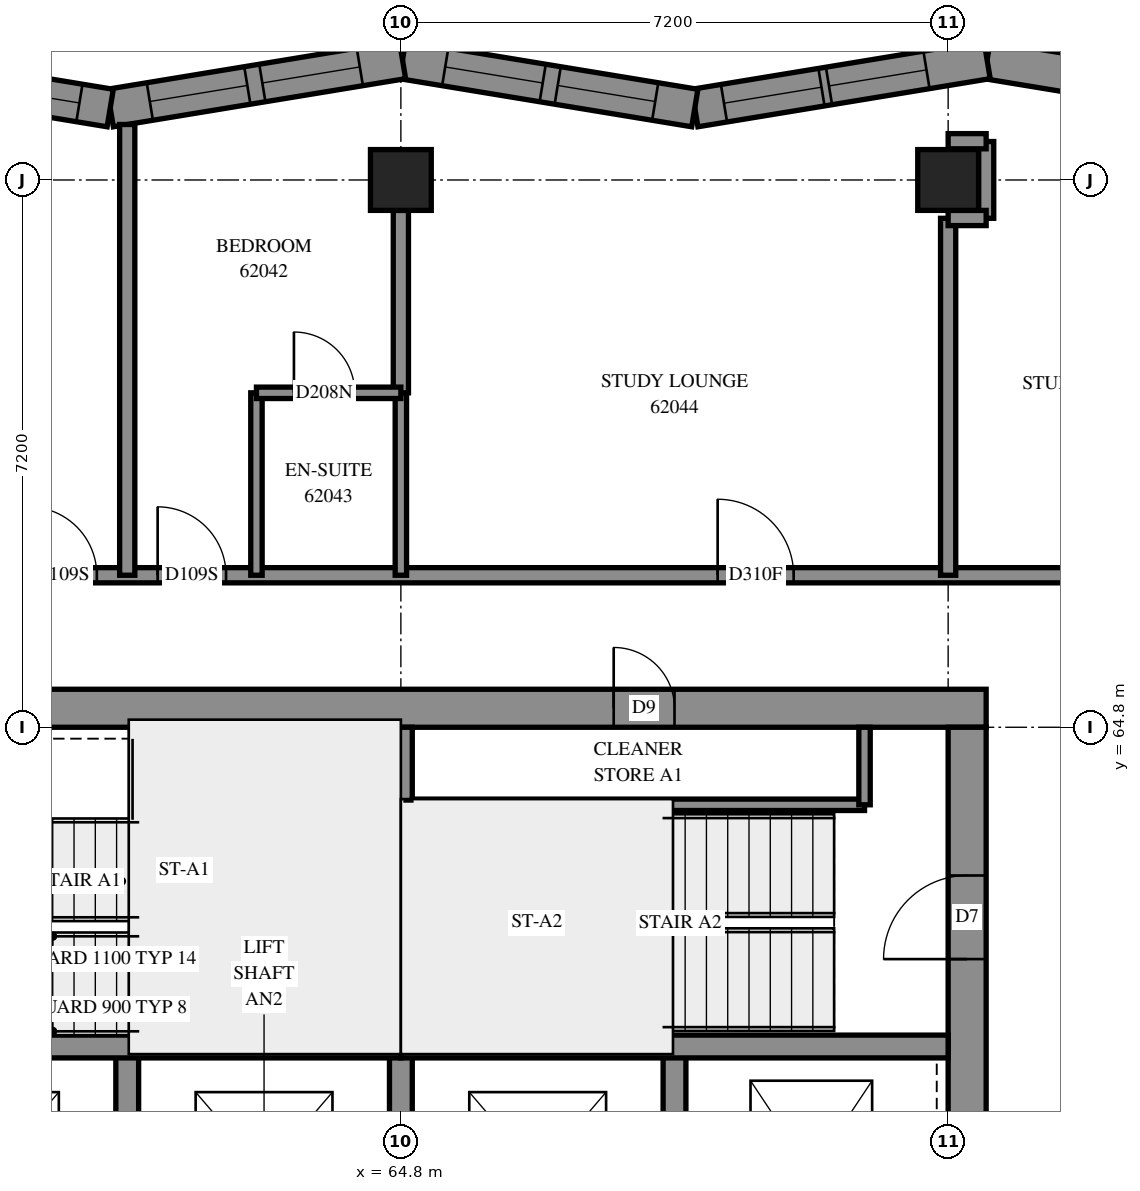
"""IFC4 building model, lengths in metres.
Left out: names, types, materials, properties, quantities, classifications, styles, units other than length and angle.
Written with IfcOpenShell. Run it as: python <this file> out.ifc"""

import sys

from ifc_helpers import new_model, si_unit, direction, frame, frame_2d, origin, origin_2d, place, context, subcontext, project, spatial, polyline, rectangle, outline, extrude, element, fill, save


model = new_model("IFC4")
c1 = context("Model", 3, precision=1e-05, world=origin(), true_north=direction((0.0, 1.0)))
c2 = subcontext(c1, "Body", "Model", "MODEL_VIEW")
j1 = project(units=[si_unit("LENGTHUNIT", "METRE"), si_unit("PLANEANGLEUNIT", "RADIAN")], contexts=[c1])
p1 = place(None, origin())
s1 = spatial("IfcSite", under=j1, at=p1, CompositionType="ELEMENT")
p2 = place(p1, origin())
s2 = spatial("IfcBuilding", under=s1, at=p2, CompositionType="ELEMENT")
p3 = place(p2, frame((0.0, 0.0, 227.0)))
s3 = spatial("IfcBuildingStorey", under=s2, at=p3, CompositionType="ELEMENT", Elevation=227.0)
for number, where, z_axis, x_axis in (
    (1, (64.8, 72.0, 0.0), (0.0, 0.0, 1.0), (1.0, 0.0, 0.0)),
    (2, (72.0, 72.0, 0.0), (0.0, 0.0, 1.0), (1.0, 0.0, 0.0)),
):
    element("IfcColumn", number, at=place(p3, frame(where, z_axis=z_axis, x_axis=x_axis)), inside=s3, PredefinedType="COLUMN", context=c2, shape_type="SweptSolid", body=[
        extrude(rectangle(XDim=0.8, YDim=0.8, at=origin_2d()), origin(), (0.0, 0.0, 1.0), 3.1),
    ])
p4 = place(p3, frame((57.1, 65.05, -0.3), z_axis=(0.0, 0.0, 1.0), x_axis=(1.0, 0.0, 0.0)))
e3 = element("IfcWall", 3, at=p4, inside=s3, PredefinedType="SHEAR", context=c2, shape_type="SweptSolid", body=[
    extrude(rectangle(XDim=15.4, YDim=0.5, at=frame_2d((7.7, 0.0))), origin(), (0.0, 0.0, 1.0), 2.7),
])
p5 = place(p4, frame((10.5, 0.0, 0.3)))
e4 = element("IfcOpeningElement", 4, at=p5, cuts=e3, PredefinedType="OPENING", context=c2, shape_type="SweptSolid", body=[
    extrude(rectangle(XDim=0.8, YDim=2.1, at=frame_2d((0.4, 1.05))), frame((0.0, 0.26, 0.0), z_axis=(0.0, -1.0, 0.0), x_axis=(1.0, 0.0, 0.0)), (0.0, 0.0, 1.0), 0.52),
])
p6 = place(p3, frame((72.25, 50.4, -0.3), z_axis=(0.0, 0.0, 1.0), x_axis=(0.0, 1.0, 0.0)))
e5 = element("IfcWall", 5, at=p6, inside=s3, PredefinedType="SHEAR", context=c2, shape_type="SweptSolid", body=[
    extrude(rectangle(XDim=14.4, YDim=0.5, at=frame_2d((7.2, 0.0))), origin(), (0.0, 0.0, 1.0), 2.7),
])
p7 = place(p6, frame((4.55, 0.0, 0.3)))
e6 = element("IfcOpeningElement", 6, at=p7, cuts=e5, PredefinedType="OPENING", context=c2, shape_type="SweptSolid", body=[
    extrude(rectangle(XDim=1.1, YDim=2.1, at=frame_2d((0.55, 1.05))), frame((0.0, 0.26, 0.0), z_axis=(0.0, -1.0, 0.0), x_axis=(1.0, 0.0, 0.0)), (0.0, 0.0, 1.0), 0.52),
])
p8 = place(p6, frame((11.35, 0.0, 0.3)))
e7 = element("IfcOpeningElement", 7, at=p8, cuts=e5, PredefinedType="OPENING", context=c2, shape_type="SweptSolid", body=[
    extrude(rectangle(XDim=1.1, YDim=2.1, at=frame_2d((0.55, 1.05))), frame((0.0, 0.26, 0.0), z_axis=(0.0, -1.0, 0.0), x_axis=(1.0, 0.0, 0.0)), (0.0, 0.0, 1.0), 0.52),
])
for number, where, z_axis, x_axis in (
    (8, (61.2, 57.3, 0.0), (0.0, 0.0, 1.0), (0.0, 1.0, 0.0)),
    (9, (64.8, 57.3, 0.0), (0.0, 0.0, 1.0), (0.0, 1.0, 0.0)),
    (10, (68.4, 57.3, 0.0), (0.0, 0.0, 1.0), (0.0, 1.0, 0.0)),
):
    element("IfcWall", number, at=place(p3, frame(where, z_axis=z_axis, x_axis=x_axis)), inside=s3, PredefinedType="SOLIDWALL", context=c2, shape_type="SweptSolid", body=[
        extrude(rectangle(XDim=3.3, YDim=0.3, at=frame_2d((1.65, 0.0))), origin(), (0.0, 0.0, 1.0), 3.1),
    ])
for number, where, z_axis, x_axis in (
    (11, (57.6, 60.6, 0.0), (0.0, 0.0, 1.0), (1.0, 0.0, 0.0)),
    (12, (64.8, 60.6, 0.0), (0.0, 0.0, 1.0), (1.0, 0.0, 0.0)),
):
    element("IfcWall", number, at=place(p3, frame(where, z_axis=z_axis, x_axis=x_axis)), inside=s3, PredefinedType="SOLIDWALL", context=c2, shape_type="SweptSolid", body=[
        extrude(rectangle(XDim=7.2, YDim=0.3, at=frame_2d((3.6, 0.0))), origin(), (0.0, 0.0, 1.0), 3.1),
    ])
p9 = place(p3, frame((64.8, 60.6, 0.0), z_axis=(0.0, 0.0, 1.0), x_axis=(0.0, 1.0, 0.0)))
e13 = element("IfcWall", 13, at=p9, inside=s3, PredefinedType="SOLIDWALL", context=c2, shape_type="SweptSolid", body=[
    extrude(rectangle(XDim=4.2, YDim=0.3, at=frame_2d((2.1, 0.0))), origin(), (0.0, 0.0, 1.0), 3.1),
])
p10 = place(p3, frame((76.377, 72.944, 0.0), z_axis=(0.0, 0.0, 1.0), x_axis=(-0.9867218052, 0.1624194546, 0.0)))
e14 = element("IfcWall", 14, at=p10, inside=s3, PredefinedType="SOLIDWALL", context=c2, shape_type="SweptSolid", body=[
    extrude(outline(polyline([(0.06, -0.25), (3.958, -0.25), (3.875, 0.25), (-0.06, 0.25), (0.06, -0.25)])), origin(), (0.0, 0.0, 1.0), 3.1),
])
p11 = place(p10, frame((1.631, 0.0, 0.45)))
e15 = element("IfcOpeningElement", 15, at=p11, cuts=e14, PredefinedType="OPENING", context=c2, shape_type="SweptSolid", body=[
    extrude(rectangle(XDim=1.2, YDim=2.5, at=frame_2d((0.6, 1.25))), frame((0.0, 0.26, 0.0), z_axis=(0.0, -1.0, 0.0), x_axis=(1.0, 0.0, 0.0)), (0.0, 0.0, 1.0), 0.52),
])
p12 = place(p3, frame((72.513, 73.58, 0.0), z_axis=(0.0, 0.0, 1.0), x_axis=(-0.9867206744, -0.1624263241, 0.0)))
e16 = element("IfcWall", 16, at=p12, inside=s3, PredefinedType="SOLIDWALL", context=c2, shape_type="SweptSolid", body=[
    extrude(outline(polyline([(-0.041, -0.25), (3.856, -0.25), (3.938, 0.25), (0.041, 0.25), (-0.041, -0.25)])), origin(), (0.0, 0.0, 1.0), 3.1),
])
p13 = place(p12, frame((0.808, 0.0, 0.45)))
e17 = element("IfcOpeningElement", 17, at=p13, cuts=e16, PredefinedType="OPENING", context=c2, shape_type="SweptSolid", body=[
    extrude(rectangle(XDim=1.3, YDim=2.5, at=frame_2d((0.65, 1.25))), frame((0.0, 0.26, 0.0), z_axis=(0.0, -1.0, 0.0), x_axis=(1.0, 0.0, 0.0)), (0.0, 0.0, 1.0), 0.52),
])
p14 = place(p12, frame((2.208, 0.0, 0.45)))
e18 = element("IfcOpeningElement", 18, at=p14, cuts=e16, PredefinedType="OPENING", context=c2, shape_type="SweptSolid", body=[
    extrude(rectangle(XDim=1.3, YDim=2.5, at=frame_2d((0.65, 1.25))), frame((0.0, 0.26, 0.0), z_axis=(0.0, -1.0, 0.0), x_axis=(1.0, 0.0, 0.0)), (0.0, 0.0, 1.0), 0.52),
])
p15 = place(p3, frame((68.667, 72.947, 0.0), z_axis=(0.0, 0.0, 1.0), x_axis=(-0.9867213513, 0.1624222118, 0.0)))
e19 = element("IfcWall", 19, at=p15, inside=s3, PredefinedType="SOLIDWALL", context=c2, shape_type="SweptSolid", body=[
    extrude(outline(polyline([(0.041, -0.25), (3.938, -0.25), (3.856, 0.25), (-0.041, 0.25), (0.041, -0.25)])), origin(), (0.0, 0.0, 1.0), 3.1),
])
p16 = place(p15, frame((0.528, 0.0, 0.45)))
e20 = element("IfcOpeningElement", 20, at=p16, cuts=e19, PredefinedType="OPENING", context=c2, shape_type="SweptSolid", body=[
    extrude(rectangle(XDim=1.3, YDim=2.5, at=frame_2d((0.65, 1.25))), frame((0.0, 0.26, 0.0), z_axis=(0.0, -1.0, 0.0), x_axis=(1.0, 0.0, 0.0)), (0.0, 0.0, 1.0), 0.52),
])
p17 = place(p15, frame((2.028, 0.0, 0.45)))
e21 = element("IfcOpeningElement", 21, at=p17, cuts=e19, PredefinedType="OPENING", context=c2, shape_type="SweptSolid", body=[
    extrude(rectangle(XDim=1.3, YDim=2.5, at=frame_2d((0.65, 1.25))), frame((0.0, 0.26, 0.0), z_axis=(0.0, -1.0, 0.0), x_axis=(1.0, 0.0, 0.0)), (0.0, 0.0, 1.0), 0.52),
])
p18 = place(p3, frame((64.822, 73.58, 0.0), z_axis=(0.0, 0.0, 1.0), x_axis=(-0.9867213513, -0.1624222118, 0.0)))
e22 = element("IfcWall", 22, at=p18, inside=s3, PredefinedType="SOLIDWALL", context=c2, shape_type="SweptSolid", body=[
    extrude(outline(polyline([(-0.041, -0.25), (3.856, -0.25), (3.938, 0.25), (0.041, 0.25), (-0.041, -0.25)])), origin(), (0.0, 0.0, 1.0), 3.1),
])
p19 = place(p18, frame((0.569, 0.0, 0.45)))
e23 = element("IfcOpeningElement", 23, at=p19, cuts=e22, PredefinedType="OPENING", context=c2, shape_type="SweptSolid", body=[
    extrude(rectangle(XDim=1.3, YDim=2.5, at=frame_2d((0.65, 1.25))), frame((0.0, 0.26, 0.0), z_axis=(0.0, -1.0, 0.0), x_axis=(1.0, 0.0, 0.0)), (0.0, 0.0, 1.0), 0.52),
])
p20 = place(p18, frame((2.069, 0.0, 0.45)))
e24 = element("IfcOpeningElement", 24, at=p20, cuts=e22, PredefinedType="OPENING", context=c2, shape_type="SweptSolid", body=[
    extrude(rectangle(XDim=1.3, YDim=2.5, at=frame_2d((0.65, 1.25))), frame((0.0, 0.26, 0.0), z_axis=(0.0, -1.0, 0.0), x_axis=(1.0, 0.0, 0.0)), (0.0, 0.0, 1.0), 0.52),
])
p21 = place(p3, frame((60.976, 72.947, 0.0), z_axis=(0.0, 0.0, 1.0), x_axis=(-0.9867206744, 0.1624263241, 0.0)))
e25 = element("IfcWall", 25, at=p21, inside=s3, PredefinedType="SOLIDWALL", context=c2, shape_type="SweptSolid", body=[
    extrude(outline(polyline([(0.041, -0.25), (3.938, -0.25), (3.856, 0.25), (-0.041, 0.25), (0.041, -0.25)])), origin(), (0.0, 0.0, 1.0), 3.1),
])
p22 = place(p21, frame((0.411, 0.0, 0.45)))
e26 = element("IfcOpeningElement", 26, at=p22, cuts=e25, PredefinedType="OPENING", context=c2, shape_type="SweptSolid", body=[
    extrude(rectangle(XDim=1.3, YDim=2.5, at=frame_2d((0.65, 1.25))), frame((0.0, 0.26, 0.0), z_axis=(0.0, -1.0, 0.0), x_axis=(1.0, 0.0, 0.0)), (0.0, 0.0, 1.0), 0.52),
])
p23 = place(p21, frame((1.911, 0.0, 0.45)))
e27 = element("IfcOpeningElement", 27, at=p23, cuts=e25, PredefinedType="OPENING", context=c2, shape_type="SweptSolid", body=[
    extrude(rectangle(XDim=1.3, YDim=2.5, at=frame_2d((0.65, 1.25))), frame((0.0, 0.26, 0.0), z_axis=(0.0, -1.0, 0.0), x_axis=(1.0, 0.0, 0.0)), (0.0, 0.0, 1.0), 0.52),
])
p24 = place(p3, frame((64.95, 63.78, 0.0), z_axis=(0.0, 0.0, 1.0), x_axis=(1.0, 0.0, 0.0)))
e28 = element("IfcWall", 28, at=p24, inside=s3, PredefinedType="PARTITIONING", context=c2, shape_type="SweptSolid", body=[
    extrude(rectangle(XDim=5.95, YDim=0.15, at=frame_2d((2.975, 0.0))), origin(), (0.0, 0.0, 1.0), 3.1),
])
p25 = place(p3, frame((70.9, 63.78, 0.0), z_axis=(0.0, 0.0, 1.0), x_axis=(0.0, 1.0, 0.0)))
e29 = element("IfcWall", 29, at=p25, inside=s3, PredefinedType="PARTITIONING", context=c2, shape_type="SweptSolid", body=[
    extrude(rectangle(XDim=1.02, YDim=0.15, at=frame_2d((0.51, 0.0))), origin(), (0.0, 0.0, 1.0), 3.1),
])
p26 = place(p3, frame((55.6, 66.8, 0.0), z_axis=(0.0, 0.0, 1.0), x_axis=(1.0, 0.0, 0.0)))
e30 = element("IfcWall", 30, at=p26, inside=s3, PredefinedType="PARTITIONING", context=c2, shape_type="SweptSolid", body=[
    extrude(rectangle(XDim=18.4, YDim=0.2, at=frame_2d((9.2, 0.0))), origin(), (0.0, 0.0, 1.0), 3.1),
])
p27 = place(p26, frame((4.3, 0.0, 0.0)))
e31 = element("IfcOpeningElement", 31, at=p27, cuts=e30, PredefinedType="OPENING", context=c2, shape_type="SweptSolid", body=[
    extrude(rectangle(XDim=0.9, YDim=2.1, at=frame_2d((0.45, 1.05))), frame((0.0, 0.11, 0.0), z_axis=(0.0, -1.0, 0.0), x_axis=(1.0, 0.0, 0.0)), (0.0, 0.0, 1.0), 0.22),
])
p28 = place(p26, frame((6.0, 0.0, 0.0)))
e32 = element("IfcOpeningElement", 32, at=p28, cuts=e30, PredefinedType="OPENING", context=c2, shape_type="SweptSolid", body=[
    extrude(rectangle(XDim=0.9, YDim=2.1, at=frame_2d((0.45, 1.05))), frame((0.0, 0.11, 0.0), z_axis=(0.0, -1.0, 0.0), x_axis=(1.0, 0.0, 0.0)), (0.0, 0.0, 1.0), 0.22),
])
p29 = place(p26, frame((13.367, 0.0, 0.0)))
e33 = element("IfcOpeningElement", 33, at=p29, cuts=e30, PredefinedType="OPENING", context=c2, shape_type="SweptSolid", body=[
    extrude(rectangle(XDim=1.0, YDim=2.1, at=frame_2d((0.5, 1.05))), frame((0.0, 0.11, 0.0), z_axis=(0.0, -1.0, 0.0), x_axis=(1.0, 0.0, 0.0)), (0.0, 0.0, 1.0), 0.22),
])
p30 = place(p3, frame((61.2, 66.8, 0.0), z_axis=(0.0, 0.0, 1.0), x_axis=(0.0, 1.0, 0.0)))
e34 = element("IfcWall", 34, at=p30, inside=s3, PredefinedType="PARTITIONING", context=c2, shape_type="SweptSolid", body=[
    extrude(rectangle(XDim=5.93, YDim=0.2, at=frame_2d((2.965, 0.0))), origin(), (0.0, 0.0, 1.0), 3.1),
])
p31 = place(p3, frame((72.0, 66.8, 0.0), z_axis=(0.0, 0.0, 1.0), x_axis=(0.0, 1.0, 0.0)))
e35 = element("IfcWall", 35, at=p31, inside=s3, PredefinedType="PARTITIONING", context=c2, shape_type="SweptSolid", body=[
    extrude(rectangle(XDim=4.696, YDim=0.2, at=frame_2d((2.348, 0.0))), origin(), (0.0, 0.0, 1.0), 3.1),
])
for number, where, z_axis, x_axis in (
    (36, (62.9, 66.8, 0.0), (0.0, 0.0, 1.0), (0.0, 1.0, 0.0)),
    (37, (64.8, 66.8, 0.0), (0.0, 0.0, 1.0), (0.0, 1.0, 0.0)),
):
    element("IfcWall", number, at=place(p3, frame(where, z_axis=z_axis, x_axis=x_axis)), inside=s3, PredefinedType="PARTITIONING", context=c2, shape_type="SweptSolid", body=[
        extrude(rectangle(XDim=2.4, YDim=0.15, at=frame_2d((1.2, 0.0))), origin(), (0.0, 0.0, 1.0), 3.1),
    ])
p32 = place(p3, frame((64.8, 69.2, 0.0), z_axis=(0.0, 0.0, 1.0), x_axis=(0.0, 1.0, 0.0)))
e38 = element("IfcWall", 38, at=p32, inside=s3, PredefinedType="PARTITIONING", context=c2, shape_type="SweptSolid", body=[
    extrude(rectangle(XDim=2.4, YDim=0.2, at=frame_2d((1.2, 0.0))), origin(), (0.0, 0.0, 1.0), 3.1),
])
p33 = place(p3, frame((62.9, 69.2, 0.0), z_axis=(0.0, 0.0, 1.0), x_axis=(1.0, 0.0, 0.0)))
e39 = element("IfcWall", 39, at=p33, inside=s3, PredefinedType="PARTITIONING", context=c2, shape_type="SweptSolid", body=[
    extrude(rectangle(XDim=1.9, YDim=0.15, at=frame_2d((0.95, 0.0))), origin(), (0.0, 0.0, 1.0), 3.1),
])
p34 = place(p33, frame((0.493, 0.0, 0.0)))
e40 = element("IfcOpeningElement", 40, at=p34, cuts=e39, PredefinedType="OPENING", context=c2, shape_type="SweptSolid", body=[
    extrude(rectangle(XDim=0.8, YDim=2.1, at=frame_2d((0.4, 1.05))), frame((0.0, 0.085, 0.0), z_axis=(0.0, -1.0, 0.0), x_axis=(1.0, 0.0, 0.0)), (0.0, 0.0, 1.0), 0.17),
])
p35 = place(p3, frame((72.5, 71.496, 0.0), z_axis=(0.0, 0.0, 1.0), x_axis=(0.0, 1.0, 0.0)))
e41 = element("IfcWall", 41, at=p35, inside=s3, PredefinedType="PARTITIONING", context=c2, shape_type="SweptSolid", body=[
    extrude(rectangle(XDim=1.01, YDim=0.2, at=frame_2d((0.505, 0.0))), origin(), (0.0, 0.0, 1.0), 3.1),
])
for number, where, z_axis, x_axis in (
    (42, (72.0, 72.51, 0.0), (0.0, 0.0, 1.0), (1.0, 0.0, 0.0)),
    (43, (72.0, 71.5, 0.0), (0.0, 0.0, 1.0), (1.0, 0.0, 0.0)),
):
    element("IfcWall", number, at=place(p3, frame(where, z_axis=z_axis, x_axis=x_axis)), inside=s3, PredefinedType="PARTITIONING", context=c2, shape_type="SweptSolid", body=[
        extrude(rectangle(XDim=0.5, YDim=0.2, at=frame_2d((0.25, 0.0))), origin(), (0.0, 0.0, 1.0), 3.1),
    ])
p36 = place(p13, origin())
e44 = element("IfcWindow", 44, at=p36, inside=s3, PartitioningType="SINGLE_PANEL", PredefinedType="WINDOW", context=c2, shape_type="SweptSolid", body=[
    extrude(rectangle(XDim=1.3, YDim=2.5, at=frame_2d((0.65, 1.25))), frame((0.0, 0.18, 0.0), z_axis=(0.0, -1.0, 0.0), x_axis=(1.0, 0.0, 0.0)), (0.0, 0.0, 1.0), 0.06),
])
fill(e17, e44)
p37 = place(p14, origin())
e45 = element("IfcWindow", 45, at=p37, inside=s3, PartitioningType="SINGLE_PANEL", PredefinedType="WINDOW", context=c2, shape_type="SweptSolid", body=[
    extrude(rectangle(XDim=1.3, YDim=2.5, at=frame_2d((0.65, 1.25))), frame((0.0, 0.18, 0.0), z_axis=(0.0, -1.0, 0.0), x_axis=(1.0, 0.0, 0.0)), (0.0, 0.0, 1.0), 0.06),
])
fill(e18, e45)
p38 = place(p16, origin())
e46 = element("IfcWindow", 46, at=p38, inside=s3, PartitioningType="SINGLE_PANEL", PredefinedType="WINDOW", context=c2, shape_type="SweptSolid", body=[
    extrude(rectangle(XDim=1.3, YDim=2.5, at=frame_2d((0.65, 1.25))), frame((0.0, 0.18, 0.0), z_axis=(0.0, -1.0, 0.0), x_axis=(1.0, 0.0, 0.0)), (0.0, 0.0, 1.0), 0.06),
])
fill(e20, e46)
p39 = place(p17, origin())
e47 = element("IfcWindow", 47, at=p39, inside=s3, PartitioningType="SINGLE_PANEL", PredefinedType="WINDOW", context=c2, shape_type="SweptSolid", body=[
    extrude(rectangle(XDim=1.3, YDim=2.5, at=frame_2d((0.65, 1.25))), frame((0.0, 0.18, 0.0), z_axis=(0.0, -1.0, 0.0), x_axis=(1.0, 0.0, 0.0)), (0.0, 0.0, 1.0), 0.06),
])
fill(e21, e47)
p40 = place(p19, origin())
e48 = element("IfcWindow", 48, at=p40, inside=s3, PartitioningType="SINGLE_PANEL", PredefinedType="WINDOW", context=c2, shape_type="SweptSolid", body=[
    extrude(rectangle(XDim=1.3, YDim=2.5, at=frame_2d((0.65, 1.25))), frame((0.0, 0.18, 0.0), z_axis=(0.0, -1.0, 0.0), x_axis=(1.0, 0.0, 0.0)), (0.0, 0.0, 1.0), 0.06),
])
fill(e23, e48)
p41 = place(p20, origin())
e49 = element("IfcWindow", 49, at=p41, inside=s3, PartitioningType="SINGLE_PANEL", PredefinedType="WINDOW", context=c2, shape_type="SweptSolid", body=[
    extrude(rectangle(XDim=1.3, YDim=2.5, at=frame_2d((0.65, 1.25))), frame((0.0, 0.18, 0.0), z_axis=(0.0, -1.0, 0.0), x_axis=(1.0, 0.0, 0.0)), (0.0, 0.0, 1.0), 0.06),
])
fill(e24, e49)
p42 = place(p22, origin())
e50 = element("IfcWindow", 50, at=p42, inside=s3, PartitioningType="SINGLE_PANEL", PredefinedType="WINDOW", context=c2, shape_type="SweptSolid", body=[
    extrude(rectangle(XDim=1.3, YDim=2.5, at=frame_2d((0.65, 1.25))), frame((0.0, 0.18, 0.0), z_axis=(0.0, -1.0, 0.0), x_axis=(1.0, 0.0, 0.0)), (0.0, 0.0, 1.0), 0.06),
])
fill(e26, e50)
p43 = place(p5, origin())
e51 = element("IfcDoor", 51, at=p43, inside=s3, OperationType="SINGLE_SWING_RIGHT", PredefinedType="DOOR", context=c2, shape_type="SweptSolid", body=[
    extrude(rectangle(XDim=0.8, YDim=2.1, at=frame_2d((0.4, 1.05))), frame((0.0, 0.025, 0.0), z_axis=(0.0, -1.0, 0.0), x_axis=(1.0, 0.0, 0.0)), (0.0, 0.0, 1.0), 0.05),
])
fill(e4, e51)
p44 = place(p8, origin())
e52 = element("IfcDoor", 52, at=p44, inside=s3, OperationType="SINGLE_SWING_RIGHT", PredefinedType="DOOR", context=c2, shape_type="SweptSolid", body=[
    extrude(rectangle(XDim=1.1, YDim=2.1, at=frame_2d((0.55, 1.05))), frame((0.0, 0.025, 0.0), z_axis=(0.0, -1.0, 0.0), x_axis=(1.0, 0.0, 0.0)), (0.0, 0.0, 1.0), 0.05),
])
fill(e7, e52)
p45 = place(p27, origin())
e53 = element("IfcDoor", 53, at=p45, inside=s3, OperationType="SINGLE_SWING_RIGHT", PredefinedType="DOOR", context=c2, shape_type="SweptSolid", body=[
    extrude(rectangle(XDim=0.9, YDim=2.1, at=frame_2d((0.45, 1.05))), frame((0.0, 0.025, 0.0), z_axis=(0.0, -1.0, 0.0), x_axis=(1.0, 0.0, 0.0)), (0.0, 0.0, 1.0), 0.05),
])
fill(e31, e53)
p46 = place(p28, origin())
e54 = element("IfcDoor", 54, at=p46, inside=s3, OperationType="SINGLE_SWING_LEFT", PredefinedType="DOOR", context=c2, shape_type="SweptSolid", body=[
    extrude(rectangle(XDim=0.9, YDim=2.1, at=frame_2d((0.45, 1.05))), frame((0.0, 0.025, 0.0), z_axis=(0.0, -1.0, 0.0), x_axis=(1.0, 0.0, 0.0)), (0.0, 0.0, 1.0), 0.05),
])
fill(e32, e54)
p47 = place(p34, origin())
e55 = element("IfcDoor", 55, at=p47, inside=s3, OperationType="SINGLE_SWING_RIGHT", PredefinedType="DOOR", context=c2, shape_type="SweptSolid", body=[
    extrude(rectangle(XDim=0.8, YDim=2.1, at=frame_2d((0.4, 1.05))), frame((0.0, 0.025, 0.0), z_axis=(0.0, -1.0, 0.0), x_axis=(1.0, 0.0, 0.0)), (0.0, 0.0, 1.0), 0.05),
])
fill(e40, e55)
p48 = place(p29, origin())
e56 = element("IfcDoor", 56, at=p48, inside=s3, OperationType="SINGLE_SWING_RIGHT", PredefinedType="DOOR", context=c2, shape_type="SweptSolid", body=[
    extrude(rectangle(XDim=1.0, YDim=2.1, at=frame_2d((0.5, 1.05))), frame((0.0, 0.025, 0.0), z_axis=(0.0, -1.0, 0.0), x_axis=(1.0, 0.0, 0.0)), (0.0, 0.0, 1.0), 0.05),
])
fill(e33, e56)
save(model, sys.argv[1])
